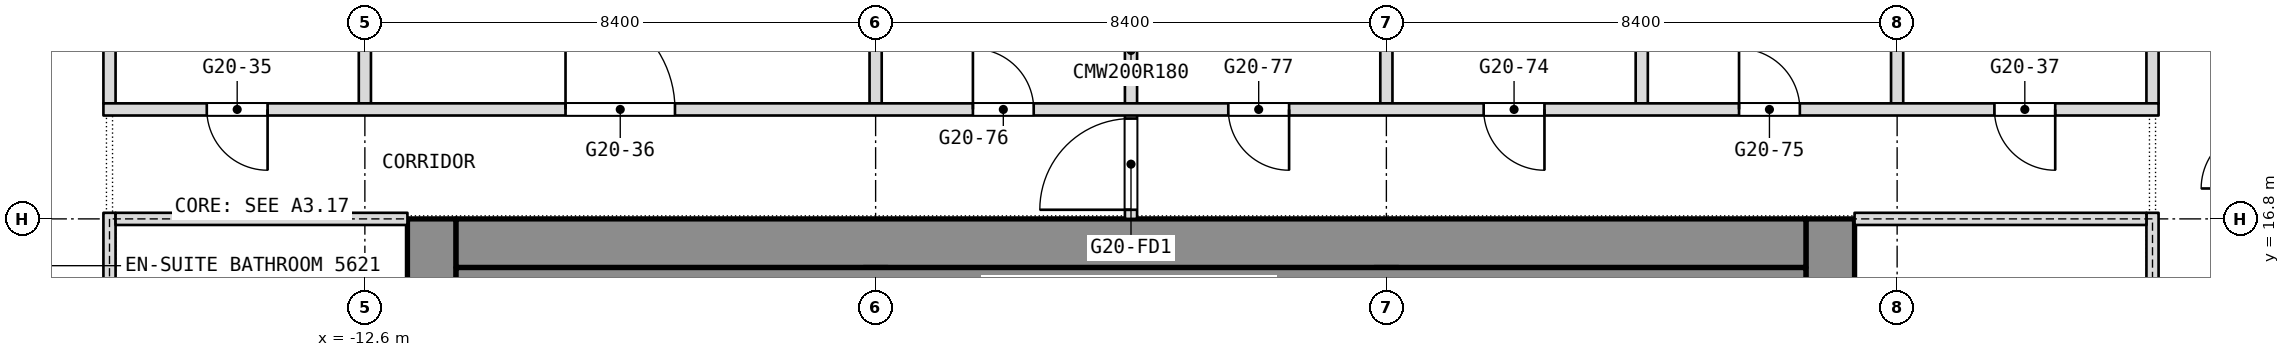
"""IFC4 building model, lengths in metres.
Left out: names, types, materials, properties, quantities, classifications, styles, units other than length and angle.
Written with IfcOpenShell. Run it as: python <this file> out.ifc"""

import sys

from ifc_helpers import new_model, si_unit, direction, frame, frame_2d, origin, place, context, subcontext, project, spatial, rectangle, extrude, element, fill, save


model = new_model("IFC4")
c1 = context("Model", 3, precision=1e-05, world=origin(), true_north=direction((0.0, 1.0)))
c2 = subcontext(c1, "Body", "Model", "MODEL_VIEW")
j1 = project(units=[si_unit("LENGTHUNIT", "METRE"), si_unit("PLANEANGLEUNIT", "RADIAN")], contexts=[c1])
p1 = place(None, origin())
s1 = spatial("IfcSite", under=j1, at=p1, CompositionType="ELEMENT")
p2 = place(p1, origin())
s2 = spatial("IfcBuilding", under=s1, at=p2, CompositionType="ELEMENT")
p3 = place(p2, frame((0.0, 0.0, 238.1)))
s3 = spatial("IfcBuildingStorey", under=s2, at=p3, CompositionType="ELEMENT", Elevation=238.1)
p4 = place(p3, frame((11.5, 0.0, 0.0), z_axis=(0.0, 0.0, 1.0), x_axis=(0.0, 1.0, 0.0)))
e1 = element("IfcWall", 1, at=p4, inside=s3, PredefinedType="SHEAR", context=c2, shape_type="SweptSolid", body=[
    extrude(rectangle(XDim=16.8, YDim=0.8, at=frame_2d((8.4, 0.0))), origin(), (0.0, 0.0, 1.0), 3.6),
])
p5 = place(p4, frame((2.3, 0.0, 0.0)))
e2 = element("IfcOpeningElement", 2, at=p5, cuts=e1, PredefinedType="OPENING", context=c2, shape_type="SweptSolid", body=[
    extrude(rectangle(XDim=1.1, YDim=2.1, at=frame_2d((0.55, 1.05))), frame((0.0, 0.4, 0.0), z_axis=(0.0, -1.0, 0.0), x_axis=(1.0, 0.0, 0.0)), (0.0, 0.0, 1.0), 0.8),
])
p6 = place(p4, frame((4.85, 0.0, 0.0)))
e3 = element("IfcOpeningElement", 3, at=p6, cuts=e1, PredefinedType="OPENING", context=c2, shape_type="SweptSolid", body=[
    extrude(rectangle(XDim=1.1, YDim=2.1, at=frame_2d((0.55, 1.05))), frame((0.0, 0.4, 0.0), z_axis=(0.0, -1.0, 0.0), x_axis=(1.0, 0.0, 0.0)), (0.0, 0.0, 1.0), 0.8),
])
p7 = place(p4, frame((6.825, 0.0, 0.0)))
e4 = element("IfcOpeningElement", 4, at=p7, cuts=e1, PredefinedType="OPENING", context=c2, shape_type="SweptSolid", body=[
    extrude(rectangle(XDim=1.2, YDim=2.1, at=frame_2d((0.6, 1.05))), frame((0.0, 0.4, 0.0), z_axis=(0.0, -1.0, 0.0), x_axis=(1.0, 0.0, 0.0)), (0.0, 0.0, 1.0), 0.8),
])
p8 = place(p4, frame((13.4, 0.0, 0.0)))
e5 = element("IfcOpeningElement", 5, at=p8, cuts=e1, PredefinedType="OPENING", context=c2, shape_type="SweptSolid", body=[
    extrude(rectangle(XDim=1.1, YDim=2.1, at=frame_2d((0.55, 1.05))), frame((0.0, 0.4, 0.0), z_axis=(0.0, -1.0, 0.0), x_axis=(1.0, 0.0, 0.0)), (0.0, 0.0, 1.0), 0.8),
])
p9 = place(p4, frame((10.85, 0.0, 0.0)))
e6 = element("IfcOpeningElement", 6, at=p9, cuts=e1, PredefinedType="OPENING", context=c2, shape_type="SweptSolid", body=[
    extrude(rectangle(XDim=1.1, YDim=2.1, at=frame_2d((0.55, 1.05))), frame((0.0, 0.4, 0.0), z_axis=(0.0, -1.0, 0.0), x_axis=(1.0, 0.0, 0.0)), (0.0, 0.0, 1.0), 0.8),
])
p10 = place(p4, frame((8.775, 0.0, 0.0)))
e7 = element("IfcOpeningElement", 7, at=p10, cuts=e1, PredefinedType="OPENING", context=c2, shape_type="SweptSolid", body=[
    extrude(rectangle(XDim=1.2, YDim=2.1, at=frame_2d((0.6, 1.05))), frame((0.0, 0.4, 0.0), z_axis=(0.0, -1.0, 0.0), x_axis=(1.0, 0.0, 0.0)), (0.0, 0.0, 1.0), 0.8),
])
p11 = place(p3, frame((-11.5, 0.0, 0.0), z_axis=(0.0, 0.0, 1.0), x_axis=(0.0, 1.0, 0.0)))
e8 = element("IfcWall", 8, at=p11, inside=s3, PredefinedType="SHEAR", context=c2, shape_type="SweptSolid", body=[
    extrude(rectangle(XDim=16.8, YDim=0.8, at=frame_2d((8.4, 0.0))), origin(), (0.0, 0.0, 1.0), 3.6),
])
p12 = place(p11, frame((1.837, 0.0, 0.0)))
e9 = element("IfcOpeningElement", 9, at=p12, cuts=e8, PredefinedType="OPENING", context=c2, shape_type="SweptSolid", body=[
    extrude(rectangle(XDim=0.9, YDim=2.1, at=frame_2d((0.45, 1.05))), frame((0.0, 0.4, 0.0), z_axis=(0.0, -1.0, 0.0), x_axis=(1.0, 0.0, 0.0)), (0.0, 0.0, 1.0), 0.8),
])
p13 = place(p11, frame((4.462, 0.0, 0.0)))
e10 = element("IfcOpeningElement", 10, at=p13, cuts=e8, PredefinedType="OPENING", context=c2, shape_type="SweptSolid", body=[
    extrude(rectangle(XDim=0.9, YDim=2.1, at=frame_2d((0.45, 1.05))), frame((0.0, 0.4, 0.0), z_axis=(0.0, -1.0, 0.0), x_axis=(1.0, 0.0, 0.0)), (0.0, 0.0, 1.0), 0.8),
])
p14 = place(p11, frame((6.825, 0.0, 0.0)))
e11 = element("IfcOpeningElement", 11, at=p14, cuts=e8, PredefinedType="OPENING", context=c2, shape_type="SweptSolid", body=[
    extrude(rectangle(XDim=1.2, YDim=2.1, at=frame_2d((0.6, 1.05))), frame((0.0, 0.4, 0.0), z_axis=(0.0, -1.0, 0.0), x_axis=(1.0, 0.0, 0.0)), (0.0, 0.0, 1.0), 0.8),
])
p15 = place(p11, frame((12.3, 0.0, 0.0)))
e12 = element("IfcOpeningElement", 12, at=p15, cuts=e8, PredefinedType="OPENING", context=c2, shape_type="SweptSolid", body=[
    extrude(rectangle(XDim=0.9, YDim=2.1, at=frame_2d((0.45, 1.05))), frame((0.0, 0.4, 0.0), z_axis=(0.0, -1.0, 0.0), x_axis=(1.0, 0.0, 0.0)), (0.0, 0.0, 1.0), 0.8),
])
p16 = place(p11, frame((8.775, 0.0, 0.0)))
e13 = element("IfcOpeningElement", 13, at=p16, cuts=e8, PredefinedType="OPENING", context=c2, shape_type="SweptSolid", body=[
    extrude(rectangle(XDim=1.2, YDim=2.1, at=frame_2d((0.6, 1.05))), frame((0.0, 0.4, 0.0), z_axis=(0.0, -1.0, 0.0), x_axis=(1.0, 0.0, 0.0)), (0.0, 0.0, 1.0), 0.8),
])
p17 = place(p3, frame((-11.1, 16.4, 0.0), z_axis=(0.0, 0.0, 1.0), x_axis=(1.0, 0.0, 0.0)))
e14 = element("IfcWall", 14, at=p17, inside=s3, PredefinedType="SHEAR", context=c2, shape_type="SweptSolid", body=[
    extrude(rectangle(XDim=22.2, YDim=0.8, at=frame_2d((11.1, 0.0))), origin(), (0.0, 0.0, 1.0), 3.6),
])
p18 = place(p3, frame((-4.2, 0.8, 0.0), z_axis=(0.0, 0.0, 1.0), x_axis=(0.0, 1.0, 0.0)))
e15 = element("IfcWall", 15, at=p18, inside=s3, PredefinedType="SHEAR", context=c2, shape_type="SweptSolid", body=[
    extrude(rectangle(XDim=15.2, YDim=0.4, at=frame_2d((7.6, 0.0))), origin(), (0.0, 0.0, 1.0), 3.6),
])
p19 = place(p18, frame((8.5, 0.0, 0.0)))
e16 = element("IfcOpeningElement", 16, at=p19, cuts=e15, PredefinedType="OPENING", context=c2, shape_type="SweptSolid", body=[
    extrude(rectangle(XDim=1.2, YDim=2.1, at=frame_2d((0.6, 1.05))), frame((0.0, 0.2, 0.0), z_axis=(0.0, -1.0, 0.0), x_axis=(1.0, 0.0, 0.0)), (0.0, 0.0, 1.0), 0.4),
])
p20 = place(p3, frame((4.2, 0.8, 0.0), z_axis=(0.0, 0.0, 1.0), x_axis=(0.0, 1.0, 0.0)))
e17 = element("IfcWall", 17, at=p20, inside=s3, PredefinedType="SHEAR", context=c2, shape_type="SweptSolid", body=[
    extrude(rectangle(XDim=15.2, YDim=0.4, at=frame_2d((7.6, 0.0))), origin(), (0.0, 0.0, 1.0), 3.6),
])
p21 = place(p20, frame((5.95, 0.0, 0.0)))
e18 = element("IfcOpeningElement", 18, at=p21, cuts=e17, PredefinedType="OPENING", context=c2, shape_type="SweptSolid", body=[
    extrude(rectangle(XDim=1.2, YDim=2.1, at=frame_2d((0.6, 1.05))), frame((0.0, 0.2, 0.0), z_axis=(0.0, -1.0, 0.0), x_axis=(1.0, 0.0, 0.0)), (0.0, 0.0, 1.0), 0.4),
])
for number, where, z_axis, x_axis in (
    (19, (16.8, 18.7, 0.0), (0.0, 0.0, 1.0), (0.0, 1.0, 0.0)),
    (20, (12.6, 18.7, 0.0), (0.0, 0.0, 1.0), (0.0, 1.0, 0.0)),
    (21, (8.4, 18.7, 0.0), (0.0, 0.0, 1.0), (0.0, 1.0, 0.0)),
    (22, (4.2, 18.7, 0.0), (0.0, 0.0, 1.0), (0.0, 1.0, 0.0)),
):
    element("IfcWall", number, at=place(p3, frame(where, z_axis=z_axis, x_axis=x_axis)), inside=s3, PredefinedType="PARTITIONING", context=c2, shape_type="SweptSolid", body=[
        extrude(rectangle(XDim=3.64, YDim=0.2, at=frame_2d((1.82, 0.0))), origin(), (0.0, 0.0, 1.0), 3.34),
    ])
p22 = place(p3, frame((0.0, 16.8, 0.0), z_axis=(0.0, 0.0, 1.0), x_axis=(0.0, 1.0, 0.0)))
e23 = element("IfcWall", 23, at=p22, inside=s3, PredefinedType="PARTITIONING", context=c2, shape_type="SweptSolid", body=[
    extrude(rectangle(XDim=5.54, YDim=0.2, at=frame_2d((2.77, 0.0))), origin(), (0.0, 0.0, 1.0), 3.34),
])
p23 = place(p22, frame((0.15, 0.0, 0.0)))
e24 = element("IfcOpeningElement", 24, at=p23, cuts=e23, PredefinedType="OPENING", context=c2, shape_type="SweptSolid", body=[
    extrude(rectangle(XDim=1.5, YDim=2.1, at=frame_2d((0.75, 1.05))), frame((0.0, 0.1, 0.0), z_axis=(0.0, -1.0, 0.0), x_axis=(1.0, 0.0, 0.0)), (0.0, 0.0, 1.0), 0.2),
])
for number, where, z_axis, x_axis in (
    (25, (-4.2, 18.7, 0.0), (0.0, 0.0, 1.0), (0.0, 1.0, 0.0)),
    (26, (-12.6, 18.7, 0.0), (0.0, 0.0, 1.0), (0.0, 1.0, 0.0)),
    (27, (-16.8, 18.7, 0.0), (0.0, 0.0, 1.0), (0.0, 1.0, 0.0)),
):
    element("IfcWall", number, at=place(p3, frame(where, z_axis=z_axis, x_axis=x_axis)), inside=s3, PredefinedType="PARTITIONING", context=c2, shape_type="SweptSolid", body=[
        extrude(rectangle(XDim=3.64, YDim=0.2, at=frame_2d((1.82, 0.0))), origin(), (0.0, 0.0, 1.0), 3.34),
    ])
p24 = place(p3, frame((-16.9, 18.6, 0.0), z_axis=(0.0, 0.0, 1.0), x_axis=(1.0, 0.0, 0.0)))
e28 = element("IfcWall", 28, at=p24, inside=s3, PredefinedType="PARTITIONING", context=c2, shape_type="SweptSolid", body=[
    extrude(rectangle(XDim=33.8, YDim=0.2, at=frame_2d((16.9, 0.0))), origin(), (0.0, 0.0, 1.0), 3.34),
])
p25 = place(p24, frame((1.7, 0.0, 0.0)))
e29 = element("IfcOpeningElement", 29, at=p25, cuts=e28, PredefinedType="OPENING", context=c2, shape_type="SweptSolid", body=[
    extrude(rectangle(XDim=1.0, YDim=2.1, at=frame_2d((0.5, 1.05))), frame((0.0, 0.1, 0.0), z_axis=(0.0, -1.0, 0.0), x_axis=(1.0, 0.0, 0.0)), (0.0, 0.0, 1.0), 0.2),
])
p26 = place(p24, frame((7.6, 0.0, 0.0)))
e30 = element("IfcOpeningElement", 30, at=p26, cuts=e28, PredefinedType="OPENING", context=c2, shape_type="SweptSolid", body=[
    extrude(rectangle(XDim=1.8, YDim=2.1, at=frame_2d((0.9, 1.05))), frame((0.0, 0.1, 0.0), z_axis=(0.0, -1.0, 0.0), x_axis=(1.0, 0.0, 0.0)), (0.0, 0.0, 1.0), 0.2),
])
p27 = place(p24, frame((31.1, 0.0, 0.0)))
e31 = element("IfcOpeningElement", 31, at=p27, cuts=e28, PredefinedType="OPENING", context=c2, shape_type="SweptSolid", body=[
    extrude(rectangle(XDim=1.0, YDim=2.1, at=frame_2d((0.5, 1.05))), frame((0.0, 0.1, 0.0), z_axis=(0.0, -1.0, 0.0), x_axis=(1.0, 0.0, 0.0)), (0.0, 0.0, 1.0), 0.2),
])
p28 = place(p24, frame((22.7, 0.0, 0.0)))
e32 = element("IfcOpeningElement", 32, at=p28, cuts=e28, PredefinedType="OPENING", context=c2, shape_type="SweptSolid", body=[
    extrude(rectangle(XDim=1.0, YDim=2.1, at=frame_2d((0.5, 1.05))), frame((0.0, 0.1, 0.0), z_axis=(0.0, -1.0, 0.0), x_axis=(1.0, 0.0, 0.0)), (0.0, 0.0, 1.0), 0.2),
])
p29 = place(p24, frame((26.9, 0.0, 0.0)))
e33 = element("IfcOpeningElement", 33, at=p29, cuts=e28, PredefinedType="OPENING", context=c2, shape_type="SweptSolid", body=[
    extrude(rectangle(XDim=1.0, YDim=2.1, at=frame_2d((0.5, 1.05))), frame((0.0, 0.1, 0.0), z_axis=(0.0, -1.0, 0.0), x_axis=(1.0, 0.0, 0.0)), (0.0, 0.0, 1.0), 0.2),
])
p30 = place(p24, frame((14.3, 0.0, 0.0)))
e34 = element("IfcOpeningElement", 34, at=p30, cuts=e28, PredefinedType="OPENING", context=c2, shape_type="SweptSolid", body=[
    extrude(rectangle(XDim=1.0, YDim=2.1, at=frame_2d((0.5, 1.05))), frame((0.0, 0.1, 0.0), z_axis=(0.0, -1.0, 0.0), x_axis=(1.0, 0.0, 0.0)), (0.0, 0.0, 1.0), 0.2),
])
p31 = place(p24, frame((18.5, 0.0, 0.0)))
e35 = element("IfcOpeningElement", 35, at=p31, cuts=e28, PredefinedType="OPENING", context=c2, shape_type="SweptSolid", body=[
    extrude(rectangle(XDim=1.0, YDim=2.1, at=frame_2d((0.5, 1.05))), frame((0.0, 0.1, 0.0), z_axis=(0.0, -1.0, 0.0), x_axis=(1.0, 0.0, 0.0)), (0.0, 0.0, 1.0), 0.2),
])
p32 = place(p3, frame((-11.1, 15.65, 0.0), z_axis=(0.0, 0.0, 1.0), x_axis=(1.0, 0.0, 0.0)))
e36 = element("IfcWall", 36, at=p32, inside=s3, PredefinedType="PARTITIONING", context=c2, shape_type="SweptSolid", body=[
    extrude(rectangle(XDim=22.2, YDim=0.7, at=frame_2d((11.1, 0.0))), origin(), (0.0, 0.0, 1.0), 3.34),
])
p33 = place(p3, frame((-16.8, -0.1, 0.0), z_axis=(0.0, 0.0, 1.0), x_axis=(0.0, 1.0, 0.0)))
e37 = element("IfcWall", 37, at=p33, inside=s3, PredefinedType="PARTITIONING", context=c2, shape_type="SweptSolid", body=[
    extrude(rectangle(XDim=17.0, YDim=0.2, at=frame_2d((8.5, 0.0))), origin(), (0.0, 0.0, 1.0), 3.34),
])
p34 = place(p33, frame((2.2, 0.0, 0.0)))
e38 = element("IfcOpeningElement", 38, at=p34, cuts=e37, PredefinedType="OPENING", context=c2, shape_type="SweptSolid", body=[
    extrude(rectangle(XDim=1.8, YDim=2.1, at=frame_2d((0.9, 1.05))), frame((0.0, 0.1, 0.0), z_axis=(0.0, -1.0, 0.0), x_axis=(1.0, 0.0, 0.0)), (0.0, 0.0, 1.0), 0.2),
])
p35 = place(p33, frame((13.0, 0.0, 0.0)))
e39 = element("IfcOpeningElement", 39, at=p35, cuts=e37, PredefinedType="OPENING", context=c2, shape_type="SweptSolid", body=[
    extrude(rectangle(XDim=1.8, YDim=2.1, at=frame_2d((0.9, 1.05))), frame((0.0, 0.1, 0.0), z_axis=(0.0, -1.0, 0.0), x_axis=(1.0, 0.0, 0.0)), (0.0, 0.0, 1.0), 0.2),
])
p36 = place(p3, frame((-16.7, 16.8, 0.0), z_axis=(0.0, 0.0, 1.0), x_axis=(1.0, 0.0, 0.0)))
e40 = element("IfcWall", 40, at=p36, inside=s3, PredefinedType="PARTITIONING", context=c2, shape_type="SweptSolid", body=[
    extrude(rectangle(XDim=4.8, YDim=0.2, at=frame_2d((2.4, 0.0))), origin(), (0.0, 0.0, 1.0), 2.94),
])
p37 = place(p3, frame((16.8, -0.1, 0.0), z_axis=(0.0, 0.0, 1.0), x_axis=(0.0, 1.0, 0.0)))
e41 = element("IfcWall", 41, at=p37, inside=s3, PredefinedType="PARTITIONING", context=c2, shape_type="SweptSolid", body=[
    extrude(rectangle(XDim=17.0, YDim=0.2, at=frame_2d((8.5, 0.0))), origin(), (0.0, 0.0, 1.0), 3.34),
])
p38 = place(p37, frame((2.2, 0.0, 0.0)))
e42 = element("IfcOpeningElement", 42, at=p38, cuts=e41, PredefinedType="OPENING", context=c2, shape_type="SweptSolid", body=[
    extrude(rectangle(XDim=1.8, YDim=2.1, at=frame_2d((0.9, 1.05))), frame((0.0, 0.1, 0.0), z_axis=(0.0, -1.0, 0.0), x_axis=(1.0, 0.0, 0.0)), (0.0, 0.0, 1.0), 0.2),
])
p39 = place(p37, frame((13.0, 0.0, 0.0)))
e43 = element("IfcOpeningElement", 43, at=p39, cuts=e41, PredefinedType="OPENING", context=c2, shape_type="SweptSolid", body=[
    extrude(rectangle(XDim=1.8, YDim=2.1, at=frame_2d((0.9, 1.05))), frame((0.0, 0.1, 0.0), z_axis=(0.0, -1.0, 0.0), x_axis=(1.0, 0.0, 0.0)), (0.0, 0.0, 1.0), 0.2),
])
p40 = place(p3, frame((11.9, 16.8, 0.0), z_axis=(0.0, 0.0, 1.0), x_axis=(1.0, 0.0, 0.0)))
e44 = element("IfcWall", 44, at=p40, inside=s3, PredefinedType="PARTITIONING", context=c2, shape_type="SweptSolid", body=[
    extrude(rectangle(XDim=4.8, YDim=0.2, at=frame_2d((2.4, 0.0))), origin(), (0.0, 0.0, 1.0), 2.94),
])
p41 = place(p25, origin())
e45 = element("IfcDoor", 45, at=p41, inside=s3, OperationType="SINGLE_SWING_LEFT", PredefinedType="DOOR", context=c2, shape_type="SweptSolid", body=[
    extrude(rectangle(XDim=1.0, YDim=2.1, at=frame_2d((0.5, 1.05))), frame((0.0, 0.025, 0.0), z_axis=(0.0, -1.0, 0.0), x_axis=(1.0, 0.0, 0.0)), (0.0, 0.0, 1.0), 0.05),
])
fill(e29, e45)
p42 = place(p26, origin())
e46 = element("IfcDoor", 46, at=p42, inside=s3, OperationType="DOUBLE_DOOR_SINGLE_SWING", PredefinedType="DOOR", context=c2, shape_type="SweptSolid", body=[
    extrude(rectangle(XDim=1.8, YDim=2.1, at=frame_2d((0.9, 1.05))), frame((0.0, 0.025, 0.0), z_axis=(0.0, -1.0, 0.0), x_axis=(1.0, 0.0, 0.0)), (0.0, 0.0, 1.0), 0.05),
])
fill(e30, e46)
p43 = place(p27, origin())
e47 = element("IfcDoor", 47, at=p43, inside=s3, OperationType="SINGLE_SWING_LEFT", PredefinedType="DOOR", context=c2, shape_type="SweptSolid", body=[
    extrude(rectangle(XDim=1.0, YDim=2.1, at=frame_2d((0.5, 1.05))), frame((0.0, 0.025, 0.0), z_axis=(0.0, -1.0, 0.0), x_axis=(1.0, 0.0, 0.0)), (0.0, 0.0, 1.0), 0.05),
])
fill(e31, e47)
p44 = place(p28, origin())
e48 = element("IfcDoor", 48, at=p44, inside=s3, OperationType="SINGLE_SWING_RIGHT", PredefinedType="DOOR", context=c2, shape_type="SweptSolid", body=[
    extrude(rectangle(XDim=1.0, YDim=2.1, at=frame_2d((0.5, 1.05))), frame((0.0, 0.025, 0.0), z_axis=(0.0, -1.0, 0.0), x_axis=(1.0, 0.0, 0.0)), (0.0, 0.0, 1.0), 0.05),
])
fill(e32, e48)
p45 = place(p29, origin())
e49 = element("IfcDoor", 49, at=p45, inside=s3, OperationType="SINGLE_SWING_LEFT", PredefinedType="DOOR", context=c2, shape_type="SweptSolid", body=[
    extrude(rectangle(XDim=1.0, YDim=2.1, at=frame_2d((0.5, 1.05))), frame((0.0, 0.025, 0.0), z_axis=(0.0, -1.0, 0.0), x_axis=(1.0, 0.0, 0.0)), (0.0, 0.0, 1.0), 0.05),
])
fill(e33, e49)
p46 = place(p30, origin())
e50 = element("IfcDoor", 50, at=p46, inside=s3, OperationType="SINGLE_SWING_RIGHT", PredefinedType="DOOR", context=c2, shape_type="SweptSolid", body=[
    extrude(rectangle(XDim=1.0, YDim=2.1, at=frame_2d((0.5, 1.05))), frame((0.0, 0.025, 0.0), z_axis=(0.0, -1.0, 0.0), x_axis=(1.0, 0.0, 0.0)), (0.0, 0.0, 1.0), 0.05),
])
fill(e34, e50)
p47 = place(p31, origin())
e51 = element("IfcDoor", 51, at=p47, inside=s3, OperationType="SINGLE_SWING_LEFT", PredefinedType="DOOR", context=c2, shape_type="SweptSolid", body=[
    extrude(rectangle(XDim=1.0, YDim=2.1, at=frame_2d((0.5, 1.05))), frame((0.0, 0.025, 0.0), z_axis=(0.0, -1.0, 0.0), x_axis=(1.0, 0.0, 0.0)), (0.0, 0.0, 1.0), 0.05),
])
fill(e35, e51)
p48 = place(p23, origin())
e52 = element("IfcDoor", 52, at=p48, inside=s3, OperationType="DOUBLE_DOOR_DOUBLE_SWING", PredefinedType="DOOR", context=c2, shape_type="SweptSolid", body=[
    extrude(rectangle(XDim=1.5, YDim=2.1, at=frame_2d((0.75, 1.05))), frame((0.0, 0.025, 0.0), z_axis=(0.0, -1.0, 0.0), x_axis=(1.0, 0.0, 0.0)), (0.0, 0.0, 1.0), 0.05),
])
fill(e24, e52)
save(model, sys.argv[1])
